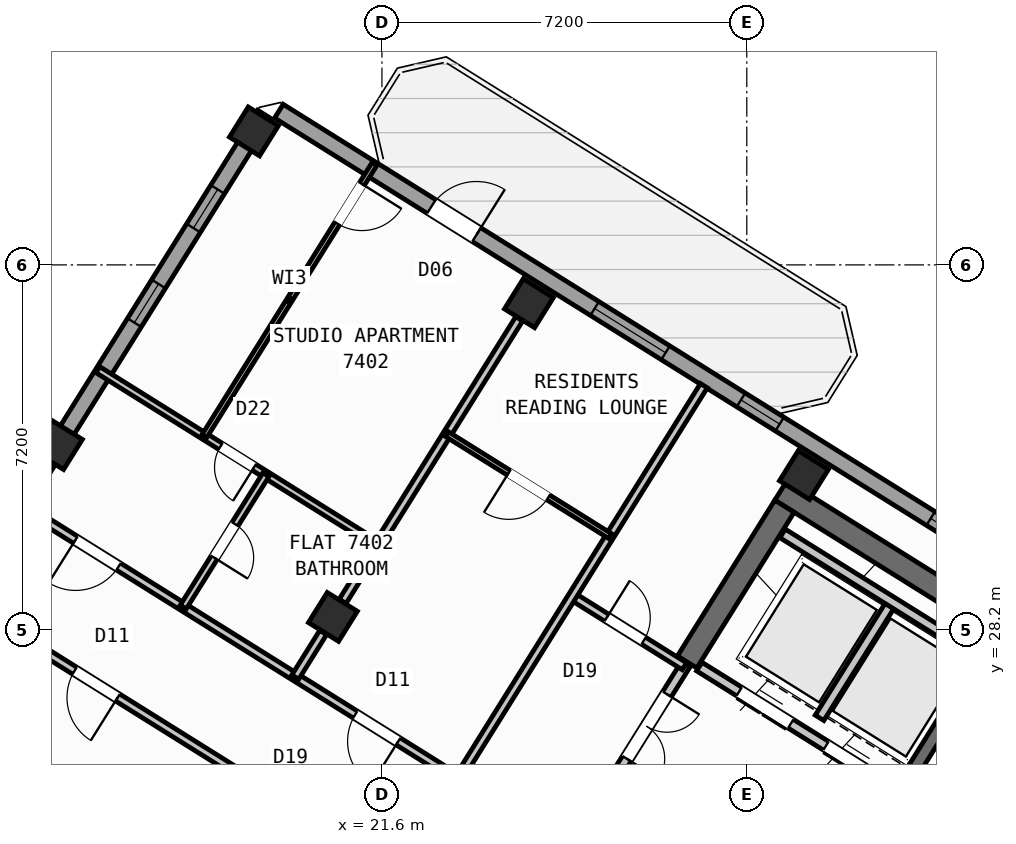
"""IFC4 building model, lengths in metres.
Left out: names, types, materials, properties, quantities, classifications, styles, units other than length and angle.
Written with IfcOpenShell. Run it as: python <this file> out.ifc"""

import sys

from ifc_helpers import new_model, si_unit, direction, frame, frame_2d, origin, origin_2d, place, context, subcontext, project, spatial, rectangle, hollow_rectangle, extrude, source, transform, mapped, element, fill, save


model = new_model("IFC4")
c1 = context("Model", 3, precision=1e-05, world=origin(), true_north=direction((0.0, 1.0)))
c2 = subcontext(c1, "Body", "Model", "MODEL_VIEW")
j1 = project(units=[si_unit("LENGTHUNIT", "METRE"), si_unit("PLANEANGLEUNIT", "RADIAN")], contexts=[c1])
p1 = place(None, origin())
s1 = spatial("IfcSite", under=j1, at=p1, CompositionType="ELEMENT")
p2 = place(p1, origin())
s2 = spatial("IfcBuilding", under=s1, at=p2, CompositionType="ELEMENT")
p3 = place(p2, frame((0.0, 0.0, 291.6)))
s3 = spatial("IfcBuildingStorey", under=s2, at=p3, CompositionType="ELEMENT", Elevation=291.6)
p4 = place(p3, frame((40.531, 24.036, 0.0), z_axis=(0.0, 0.0, 1.0), x_axis=(-0.848048787466, 0.529918157905, 0.0)))
e1 = element("IfcWall", 1, at=p4, inside=s3, PredefinedType="SHEAR", context=c2, shape_type="SweptSolid", body=[
    extrude(rectangle(XDim=13.04, YDim=0.45, at=frame_2d((6.52, 0.0))), origin(), (0.0, 0.0, 1.0), 3.35),
])
p5 = place(p3, frame((29.544, 30.636, 0.0), z_axis=(0.0, 0.0, 1.0), x_axis=(-0.529902075036, -0.848058836916, 0.0)))
e2 = element("IfcWall", 2, at=p5, inside=s3, PredefinedType="SHEAR", context=c2, shape_type="SweptSolid", body=[
    extrude(rectangle(XDim=3.625, YDim=0.45, at=frame_2d((1.812, 0.0))), origin(), (0.0, 0.0, 1.0), 3.35),
])
m1 = source(origin(), c2, "Body", "SweptSolid", [
    extrude(hollow_rectangle(XDim=0.7, YDim=0.7, WallThickness=0.028, at=origin_2d()), origin(), (0.0, 0.0, 1.0), 3.6),
])
for number, where, z_axis, x_axis in (
    (3, (29.928, 31.251, 0.0), (0.0, 0.0, 1.0), (-0.848, 0.53, 0.0)),
    (4, (24.5, 34.643, 0.0), (0.0, 0.0, 1.0), (-0.848, 0.53, 0.0)),
    (5, (20.632, 28.452, 0.0), (0.0, 0.0, 1.0), (-0.848, 0.53, 0.0)),
    (6, (19.073, 38.034, 0.0), (0.0, 0.0, 1.0), (-0.848, 0.53, 0.0)),
    (7, (15.205, 31.844, 0.0), (0.0, 0.0, 1.0), (-0.848, 0.53, 0.0)),
):
    element("IfcColumn", number, at=place(p3, frame(where, z_axis=z_axis, x_axis=x_axis)), inside=s3, PredefinedType="COLUMN", context=c2, shape_type="MappedRepresentation", body=[
        mapped(m1, transform((0.0, 0.0, 0.0), scale=1.0)),
    ])
p6 = place(p3, frame((7.842, 20.061, 0.0), z_axis=(0.0, 0.0, 1.0), x_axis=(0.529915577903, 0.84805039962, 0.0)))
e8 = element("IfcWall", 8, at=p6, inside=s3, PredefinedType="STANDARD", context=c2, shape_type="SweptSolid", body=[
    extrude(rectangle(XDim=21.587, YDim=0.32, at=frame_2d((10.794, 0.0))), origin(), (0.0, 0.0, 1.0), 2.875),
])
p7 = place(p6, frame((1.368, 0.0, 0.9)))
e9 = element("IfcOpeningElement", 9, at=p7, cuts=e8, PredefinedType="OPENING", context=c2, shape_type="SweptSolid", body=[
    extrude(rectangle(XDim=1.65, YDim=1.45, at=frame_2d((0.825, 0.725))), frame((0.0, 0.17, 0.0), z_axis=(0.0, -1.0, 0.0), x_axis=(1.0, 0.0, 0.0)), (0.0, 0.0, 1.0), 0.34),
])
p8 = place(p6, frame((4.71, 0.0, 1.0)))
e10 = element("IfcOpeningElement", 10, at=p8, cuts=e8, PredefinedType="OPENING", context=c2, shape_type="SweptSolid", body=[
    extrude(rectangle(XDim=0.9, YDim=1.25, at=frame_2d((0.45, 0.625))), frame((0.0, 0.17, 0.0), z_axis=(0.0, -1.0, 0.0), x_axis=(1.0, 0.0, 0.0)), (0.0, 0.0, 1.0), 0.34),
])
p9 = place(p6, frame((7.554, 0.0, 0.95)))
e11 = element("IfcOpeningElement", 11, at=p9, cuts=e8, PredefinedType="OPENING", context=c2, shape_type="SweptSolid", body=[
    extrude(rectangle(XDim=1.95, YDim=1.35, at=frame_2d((0.975, 0.675))), frame((0.0, 0.17, 0.0), z_axis=(0.0, -1.0, 0.0), x_axis=(1.0, 0.0, 0.0)), (0.0, 0.0, 1.0), 0.34),
])
p10 = place(p6, frame((16.744, 0.0, 1.0)))
e12 = element("IfcOpeningElement", 12, at=p10, cuts=e8, PredefinedType="OPENING", context=c2, shape_type="SweptSolid", body=[
    extrude(rectangle(XDim=0.9, YDim=1.25, at=frame_2d((0.45, 0.625))), frame((0.0, 0.17, 0.0), z_axis=(0.0, -1.0, 0.0), x_axis=(1.0, 0.0, 0.0)), (0.0, 0.0, 1.0), 0.34),
])
p11 = place(p6, frame((18.944, 0.0, 1.0)))
e13 = element("IfcOpeningElement", 13, at=p11, cuts=e8, PredefinedType="OPENING", context=c2, shape_type="SweptSolid", body=[
    extrude(rectangle(XDim=0.9, YDim=1.25, at=frame_2d((0.45, 0.625))), frame((0.0, 0.17, 0.0), z_axis=(0.0, -1.0, 0.0), x_axis=(1.0, 0.0, 0.0)), (0.0, 0.0, 1.0), 0.34),
])
p12 = place(p3, frame((19.566, 38.434, 0.0), z_axis=(0.0, 0.0, 1.0), x_axis=(0.84804567626, -0.529923136858, 0.0)))
e14 = element("IfcWall", 14, at=p12, inside=s3, PredefinedType="STANDARD", context=c2, shape_type="SweptSolid", body=[
    extrude(rectangle(XDim=25.188, YDim=0.32, at=frame_2d((12.594, 0.0))), origin(), (0.0, 0.0, 1.0), 3.35),
])
p13 = place(p12, frame((3.55, 0.0, 0.0)))
e15 = element("IfcOpeningElement", 15, at=p13, cuts=e14, PredefinedType="OPENING", context=c2, shape_type="SweptSolid", body=[
    extrude(rectangle(XDim=1.05, YDim=2.15, at=frame_2d((0.525, 1.075))), frame((0.0, 0.17, 0.0), z_axis=(0.0, -1.0, 0.0), x_axis=(1.0, 0.0, 0.0)), (0.0, 0.0, 1.0), 0.34),
])
p14 = place(p12, frame((7.349, 0.0, 0.9)))
e16 = element("IfcOpeningElement", 16, at=p14, cuts=e14, PredefinedType="OPENING", context=c2, shape_type="SweptSolid", body=[
    extrude(rectangle(XDim=1.65, YDim=1.45, at=frame_2d((0.825, 0.725))), frame((0.0, 0.17, 0.0), z_axis=(0.0, -1.0, 0.0), x_axis=(1.0, 0.0, 0.0)), (0.0, 0.0, 1.0), 0.34),
])
p15 = place(p12, frame((10.754, 0.0, 1.0)))
e17 = element("IfcOpeningElement", 17, at=p15, cuts=e14, PredefinedType="OPENING", context=c2, shape_type="SweptSolid", body=[
    extrude(rectangle(XDim=0.9, YDim=1.25, at=frame_2d((0.45, 0.625))), frame((0.0, 0.17, 0.0), z_axis=(0.0, -1.0, 0.0), x_axis=(1.0, 0.0, 0.0)), (0.0, 0.0, 1.0), 0.34),
])
p16 = place(p12, frame((15.169, 0.0, 0.95)))
e18 = element("IfcOpeningElement", 18, at=p16, cuts=e14, PredefinedType="OPENING", context=c2, shape_type="SweptSolid", body=[
    extrude(rectangle(XDim=1.95, YDim=1.35, at=frame_2d((0.975, 0.675))), frame((0.0, 0.17, 0.0), z_axis=(0.0, -1.0, 0.0), x_axis=(1.0, 0.0, 0.0)), (0.0, 0.0, 1.0), 0.34),
])
p17 = place(p12, frame((20.869, 0.0, 0.95)))
e19 = element("IfcOpeningElement", 19, at=p17, cuts=e14, PredefinedType="OPENING", context=c2, shape_type="SweptSolid", body=[
    extrude(rectangle(XDim=1.95, YDim=1.35, at=frame_2d((0.975, 0.675))), frame((0.0, 0.17, 0.0), z_axis=(0.0, -1.0, 0.0), x_axis=(1.0, 0.0, 0.0)), (0.0, 0.0, 1.0), 0.34),
])
p18 = place(p3, frame((33.496, 27.677, 0.0), z_axis=(0.0, 0.0, 1.0), x_axis=(-0.529908658664, -0.84805472316, 0.0)))
e20 = element("IfcWall", 20, at=p18, inside=s3, PredefinedType="SHEAR", context=c2, shape_type="SweptSolid", body=[
    extrude(rectangle(XDim=3.16, YDim=0.26, at=frame_2d((1.58, 0.0))), origin(), (0.0, 0.0, 1.0), 3.35),
])
p19 = place(p3, frame((31.822, 24.998, 0.0), z_axis=(0.0, 0.0, 1.0), x_axis=(-0.848054125777, 0.529909614701, 0.0)))
e21 = element("IfcWall", 21, at=p19, inside=s3, PredefinedType="STANDARD", context=c2, shape_type="SweptSolid", body=[
    extrude(rectangle(XDim=4.668, YDim=0.2, at=frame_2d((2.334, 0.0))), origin(), (0.0, 0.0, 1.0), 3.34),
])
p20 = place(p19, frame((0.52, 0.0, 0.0)))
e22 = element("IfcOpeningElement", 22, at=p20, cuts=e21, PredefinedType="OPENING", context=c2, shape_type="SweptSolid", body=[
    extrude(rectangle(XDim=1.2, YDim=2.15, at=frame_2d((0.6, 1.075))), frame((0.0, 0.11, 0.0), z_axis=(0.0, -1.0, 0.0), x_axis=(1.0, 0.0, 0.0)), (0.0, 0.0, 1.0), 0.22),
])
p21 = place(p19, frame((2.54, 0.0, 0.0)))
e23 = element("IfcOpeningElement", 23, at=p21, cuts=e21, PredefinedType="OPENING", context=c2, shape_type="SweptSolid", body=[
    extrude(rectangle(XDim=1.2, YDim=2.15, at=frame_2d((0.6, 1.075))), frame((0.0, 0.11, 0.0), z_axis=(0.0, -1.0, 0.0), x_axis=(1.0, 0.0, 0.0)), (0.0, 0.0, 1.0), 0.22),
])
p22 = place(p3, frame((31.645, 28.716, 0.0), z_axis=(0.0, 0.0, 1.0), x_axis=(-0.52986693015, -0.848080795876, 0.0)))
e24 = element("IfcWall", 24, at=p22, inside=s3, PredefinedType="STANDARD", context=c2, shape_type="SweptSolid", body=[
    extrude(rectangle(XDim=2.66, YDim=0.2, at=frame_2d((1.33, 0.0))), origin(), (0.0, 0.0, 1.0), 3.34),
])
p23 = place(p3, frame((33.363, 27.69, 0.0), z_axis=(0.0, 0.0, 1.0), x_axis=(-0.84804957148, 0.529916903215, 0.0)))
e25 = element("IfcWall", 25, at=p23, inside=s3, PredefinedType="STANDARD", context=c2, shape_type="SweptSolid", body=[
    extrude(rectangle(XDim=4.548, YDim=0.2, at=frame_2d((2.274, 0.0))), origin(), (0.0, 0.0, 1.0), 3.34),
])
p24 = place(p3, frame((27.596, 27.52, 0.0), z_axis=(0.0, 0.0, 1.0), x_axis=(-0.529865479138, -0.848081702443, 0.0)))
e26 = element("IfcWall", 26, at=p24, inside=s3, PredefinedType="STANDARD", context=c2, shape_type="SweptSolid", body=[
    extrude(rectangle(XDim=2.96, YDim=0.2, at=frame_2d((1.48, 0.0))), origin(), (0.0, 0.0, 1.0), 3.34),
])
p25 = place(p24, frame((0.7, 0.0, 0.0)))
e27 = element("IfcOpeningElement", 27, at=p25, cuts=e26, PredefinedType="OPENING", context=c2, shape_type="SweptSolid", body=[
    extrude(rectangle(XDim=1.5, YDim=2.15, at=frame_2d((0.75, 1.075))), frame((0.0, 0.11, 0.0), z_axis=(0.0, -1.0, 0.0), x_axis=(1.0, 0.0, 0.0)), (0.0, 0.0, 1.0), 0.22),
])
p26 = place(p3, frame((27.57, 27.478, 0.0), z_axis=(0.0, 0.0, 1.0), x_axis=(-0.848050851465, 0.529914854792, 0.0)))
e28 = element("IfcWall", 28, at=p26, inside=s3, PredefinedType="PARTITIONING", context=c2, shape_type="SweptSolid", body=[
    extrude(rectangle(XDim=2.61, YDim=0.16, at=frame_2d((1.305, 0.0))), origin(), (0.0, 0.0, 1.0), 3.34),
])
p27 = place(p26, frame((0.95, 0.0, 0.0)))
e29 = element("IfcOpeningElement", 29, at=p27, cuts=e28, PredefinedType="OPENING", context=c2, shape_type="SweptSolid", body=[
    extrude(rectangle(XDim=0.86, YDim=2.05, at=frame_2d((0.43, 1.025))), frame((0.0, 0.09, 0.0), z_axis=(0.0, -1.0, 0.0), x_axis=(1.0, 0.0, 0.0)), (0.0, 0.0, 1.0), 0.18),
])
p28 = place(p3, frame((27.953, 33.016, 0.0), z_axis=(0.0, 0.0, 1.0), x_axis=(-0.529903001606, -0.848058257957, 0.0)))
e30 = element("IfcWall", 30, at=p28, inside=s3, PredefinedType="PARTITIONING", context=c2, shape_type="SweptSolid", body=[
    extrude(rectangle(XDim=9.15, YDim=0.16, at=frame_2d((4.575, 0.0))), origin(), (0.0, 0.0, 1.0), 3.34),
])
p29 = place(p3, frame((23.104, 25.256, 0.0), z_axis=(0.0, 0.0, 1.0), x_axis=(-0.848043444964, 0.529926707624, 0.0)))
e31 = element("IfcWall", 31, at=p29, inside=s3, PredefinedType="PARTITIONING", context=c2, shape_type="SweptSolid", body=[
    extrude(rectangle(XDim=10.33, YDim=0.16, at=frame_2d((5.165, 0.0))), origin(), (0.0, 0.0, 1.0), 3.34),
])
p30 = place(p29, frame((1.395, 0.0, 0.0)))
e32 = element("IfcOpeningElement", 32, at=p30, cuts=e31, PredefinedType="OPENING", context=c2, shape_type="SweptSolid", body=[
    extrude(rectangle(XDim=1.0, YDim=2.1, at=frame_2d((0.5, 1.05))), frame((0.0, 0.09, 0.0), z_axis=(0.0, -1.0, 0.0), x_axis=(1.0, 0.0, 0.0)), (0.0, 0.0, 1.0), 0.18),
])
p31 = place(p29, frame((7.904, 0.0, 0.0)))
e33 = element("IfcOpeningElement", 33, at=p31, cuts=e31, PredefinedType="OPENING", context=c2, shape_type="SweptSolid", body=[
    extrude(rectangle(XDim=1.0, YDim=2.1, at=frame_2d((0.5, 1.05))), frame((0.0, 0.09, 0.0), z_axis=(0.0, -1.0, 0.0), x_axis=(1.0, 0.0, 0.0)), (0.0, 0.0, 1.0), 0.18),
])
p32 = place(p3, frame((21.938, 23.391, 0.0), z_axis=(0.0, 0.0, 1.0), x_axis=(-0.848050081784, 0.529916086552, 0.0)))
e34 = element("IfcWall", 34, at=p32, inside=s3, PredefinedType="PARTITIONING", context=c2, shape_type="SweptSolid", body=[
    extrude(rectangle(XDim=10.33, YDim=0.16, at=frame_2d((5.165, 0.0))), origin(), (0.0, 0.0, 1.0), 3.34),
])
p33 = place(p32, frame((2.22, 0.0, 0.0)))
e35 = element("IfcOpeningElement", 35, at=p33, cuts=e34, PredefinedType="OPENING", context=c2, shape_type="SweptSolid", body=[
    extrude(rectangle(XDim=0.86, YDim=2.05, at=frame_2d((0.43, 1.025))), frame((0.0, 0.09, 0.0), z_axis=(0.0, -1.0, 0.0), x_axis=(1.0, 0.0, 0.0)), (0.0, 0.0, 1.0), 0.18),
])
p34 = place(p32, frame((6.55, 0.0, 0.0)))
e36 = element("IfcOpeningElement", 36, at=p34, cuts=e34, PredefinedType="OPENING", context=c2, shape_type="SweptSolid", body=[
    extrude(rectangle(XDim=1.0, YDim=2.1, at=frame_2d((0.5, 1.05))), frame((0.0, 0.09, 0.0), z_axis=(0.0, -1.0, 0.0), x_axis=(1.0, 0.0, 0.0)), (0.0, 0.0, 1.0), 0.18),
])
p35 = place(p3, frame((24.309, 34.336, 0.0), z_axis=(0.0, 0.0, 1.0), x_axis=(-0.529895484599, -0.848062954858, 0.0)))
e37 = element("IfcWall", 37, at=p35, inside=s3, PredefinedType="PARTITIONING", context=c2, shape_type="SweptSolid", body=[
    extrude(rectangle(XDim=6.576, YDim=0.16, at=frame_2d((3.288, 0.0))), origin(), (0.0, 0.0, 1.0), 2.875),
])
p36 = place(p3, frame((20.44, 28.145, 0.0), z_axis=(0.0, 0.0, 1.0), x_axis=(-0.529977795385, -0.848011519025, 0.0)))
e38 = element("IfcWall", 38, at=p36, inside=s3, PredefinedType="PARTITIONING", context=c2, shape_type="SweptSolid", body=[
    extrude(rectangle(XDim=1.038, YDim=0.16, at=frame_2d((0.519, 0.0))), origin(), (0.0, 0.0, 1.0), 2.875),
])
p37 = place(p3, frame((26.099, 30.05, 0.0), z_axis=(0.0, 0.0, 1.0), x_axis=(-0.84803087207, 0.529946827537, 0.0)))
e39 = element("IfcWall", 39, at=p37, inside=s3, PredefinedType="PARTITIONING", context=c2, shape_type="SweptSolid", body=[
    extrude(rectangle(XDim=3.79, YDim=0.11, at=frame_2d((1.895, 0.0))), origin(), (0.0, 0.0, 1.0), 3.34),
])
p38 = place(p37, frame((1.435, 0.0, 0.0)))
e40 = element("IfcOpeningElement", 40, at=p38, cuts=e39, PredefinedType="OPENING", context=c2, shape_type="SweptSolid", body=[
    extrude(rectangle(XDim=0.92, YDim=2.08, at=frame_2d((0.46, 1.04))), frame((0.0, 0.065, 0.0), z_axis=(0.0, -1.0, 0.0), x_axis=(1.0, 0.0, 0.0)), (0.0, 0.0, 1.0), 0.13),
])
p39 = place(p3, frame((21.522, 29.877, 0.0), z_axis=(0.0, 0.0, 1.0), x_axis=(-0.848048787466, 0.529918157905, 0.0)))
e41 = element("IfcWall", 41, at=p39, inside=s3, PredefinedType="PLUMBINGWALL", context=c2, shape_type="SweptSolid", body=[
    extrude(rectangle(XDim=6.52, YDim=0.14, at=frame_2d((3.26, 0.0))), origin(), (0.0, 0.0, 1.0), 3.34),
])
p40 = place(p39, frame((2.885, 0.0, 0.0)))
e42 = element("IfcOpeningElement", 42, at=p40, cuts=e41, PredefinedType="OPENING", context=c2, shape_type="SweptSolid", body=[
    extrude(rectangle(XDim=0.78, YDim=2.05, at=frame_2d((0.39, 1.025))), frame((0.0, 0.08, 0.0), z_axis=(0.0, -1.0, 0.0), x_axis=(1.0, 0.0, 0.0)), (0.0, 0.0, 1.0), 0.16),
])
p41 = place(p3, frame((19.311, 31.259, 0.0), z_axis=(0.0, 0.0, 1.0), x_axis=(-0.52989206052, -0.848065094316, 0.0)))
e43 = element("IfcWall", 43, at=p41, inside=s3, PredefinedType="PLUMBINGWALL", context=c2, shape_type="SweptSolid", body=[
    extrude(rectangle(XDim=3.08, YDim=0.14, at=frame_2d((1.54, 0.0))), origin(), (0.0, 0.0, 1.0), 3.34),
])
p42 = place(p41, frame((1.15, 0.0, 0.0)))
e44 = element("IfcOpeningElement", 44, at=p42, cuts=e43, PredefinedType="OPENING", context=c2, shape_type="SweptSolid", body=[
    extrude(rectangle(XDim=0.78, YDim=2.05, at=frame_2d((0.39, 1.025))), frame((0.0, 0.08, 0.0), z_axis=(0.0, -1.0, 0.0), x_axis=(1.0, 0.0, 0.0)), (0.0, 0.0, 1.0), 0.16),
])
p43 = place(p3, frame((21.454, 37.395, 0.0), z_axis=(0.0, 0.0, 1.0), x_axis=(-0.529922785174, -0.848045896018, 0.0)))
e45 = element("IfcWall", 45, at=p43, inside=s3, PredefinedType="PARTITIONING", context=c2, shape_type="SweptSolid", body=[
    extrude(rectangle(XDim=6.34, YDim=0.11, at=frame_2d((3.17, 0.0))), origin(), (0.0, 0.0, 1.0), 3.025),
])
p44 = place(p43, frame((0.47, 0.0, 0.0)))
e46 = element("IfcOpeningElement", 46, at=p44, cuts=e45, PredefinedType="OPENING", context=c2, shape_type="SweptSolid", body=[
    extrude(rectangle(XDim=0.92, YDim=2.08, at=frame_2d((0.46, 1.04))), frame((0.0, 0.065, 0.0), z_axis=(0.0, -1.0, 0.0), x_axis=(1.0, 0.0, 0.0)), (0.0, 0.0, 1.0), 0.13),
])
m2 = source(origin(), c2, "Body", "SweptSolid", [
    extrude(rectangle(XDim=1.05, YDim=2.15, at=frame_2d((0.525, 1.075))), frame((0.0, 0.025, 0.0), z_axis=(0.0, -1.0, 0.0), x_axis=(1.0, 0.0, 0.0)), (0.0, 0.0, 1.0), 0.05),
])
p45 = place(p13, origin())
e47 = element("IfcDoor", 47, at=p45, inside=s3, OperationType="SINGLE_SWING_RIGHT", PredefinedType="DOOR", context=c2, shape_type="MappedRepresentation", body=[
    mapped(m2, transform((0.0, 0.0, 0.0), scale=1.0)),
])
fill(e15, e47)
m3 = source(origin(), c2, "Body", "SweptSolid", [
    extrude(rectangle(XDim=0.9, YDim=1.25, at=frame_2d((0.45, 0.625))), frame((0.0, 0.03, 0.0), z_axis=(0.0, -1.0, 0.0), x_axis=(1.0, 0.0, 0.0)), (0.0, 0.0, 1.0), 0.06),
])
p46 = place(p10, origin())
e48 = element("IfcWindow", 48, at=p46, inside=s3, PartitioningType="SINGLE_PANEL", PredefinedType="WINDOW", context=c2, shape_type="MappedRepresentation", body=[
    mapped(m3, transform((0.0, 0.0, 0.0), scale=1.0)),
])
fill(e12, e48)
p47 = place(p11, origin())
e49 = element("IfcWindow", 49, at=p47, inside=s3, PartitioningType="SINGLE_PANEL", PredefinedType="WINDOW", context=c2, shape_type="MappedRepresentation", body=[
    mapped(m3, transform((0.0, 0.0, 0.0), scale=1.0)),
])
fill(e13, e49)
m4 = source(origin(), c2, "Body", "SweptSolid", [
    extrude(rectangle(XDim=1.65, YDim=1.45, at=frame_2d((0.825, 0.725))), frame((0.0, 0.03, 0.0), z_axis=(0.0, -1.0, 0.0), x_axis=(1.0, 0.0, 0.0)), (0.0, 0.0, 1.0), 0.06),
])
p48 = place(p14, origin())
e50 = element("IfcWindow", 50, at=p48, inside=s3, PartitioningType="SINGLE_PANEL", PredefinedType="WINDOW", context=c2, shape_type="MappedRepresentation", body=[
    mapped(m4, transform((0.0, 0.0, 0.0), scale=1.0)),
])
fill(e16, e50)
p49 = place(p15, origin())
e51 = element("IfcWindow", 51, at=p49, inside=s3, PartitioningType="SINGLE_PANEL", PredefinedType="WINDOW", context=c2, shape_type="MappedRepresentation", body=[
    mapped(m3, transform((0.0, 0.0, 0.0), scale=1.0)),
])
fill(e17, e51)
m5 = source(origin(), c2, "Body", "SweptSolid", [
    extrude(rectangle(XDim=1.95, YDim=1.35, at=frame_2d((0.975, 0.675))), frame((0.0, 0.03, 0.0), z_axis=(0.0, -1.0, 0.0), x_axis=(1.0, 0.0, 0.0)), (0.0, 0.0, 1.0), 0.06),
])
p50 = place(p16, origin())
e52 = element("IfcWindow", 52, at=p50, inside=s3, PartitioningType="SINGLE_PANEL", PredefinedType="WINDOW", context=c2, shape_type="MappedRepresentation", body=[
    mapped(m5, transform((0.0, 0.0, 0.0), scale=1.0)),
])
fill(e18, e52)
m6 = source(origin(), c2, "Body", "SweptSolid", [
    extrude(rectangle(XDim=1.2, YDim=2.15, at=frame_2d((0.6, 1.075))), frame((0.0, 0.025, 0.0), z_axis=(0.0, -1.0, 0.0), x_axis=(1.0, 0.0, 0.0)), (0.0, 0.0, 1.0), 0.05),
])
p51 = place(p20, origin())
e53 = element("IfcDoor", 53, at=p51, inside=s3, OperationType="DOUBLE_DOOR_SLIDING", PredefinedType="DOOR", context=c2, shape_type="MappedRepresentation", body=[
    mapped(m6, transform((0.0, 0.0, 0.0), scale=1.0)),
])
fill(e22, e53)
p52 = place(p21, origin())
e54 = element("IfcDoor", 54, at=p52, inside=s3, OperationType="DOUBLE_DOOR_SLIDING", PredefinedType="DOOR", context=c2, shape_type="MappedRepresentation", body=[
    mapped(m6, transform((0.0, 0.0, 0.0), scale=1.0)),
])
fill(e23, e54)
m7 = source(origin(), c2, "Body", "SweptSolid", [
    extrude(rectangle(XDim=0.86, YDim=2.05, at=frame_2d((0.43, 1.025))), frame((0.0, 0.025, 0.0), z_axis=(0.0, -1.0, 0.0), x_axis=(1.0, 0.0, 0.0)), (0.0, 0.0, 1.0), 0.05),
])
p53 = place(p27, frame((0.86, 0.0, 0.0), z_axis=(0.0, 0.0, 1.0), x_axis=(-1.0, 0.0, 0.0)))
e55 = element("IfcDoor", 55, at=p53, inside=s3, OperationType="SINGLE_SWING_LEFT", PredefinedType="DOOR", context=c2, shape_type="MappedRepresentation", body=[
    mapped(m7, transform((0.0, 0.0, 0.0), scale=1.0)),
])
fill(e29, e55)
m8 = source(origin(), c2, "Body", "SweptSolid", [
    extrude(rectangle(XDim=1.5, YDim=2.15, at=frame_2d((0.75, 1.075))), frame((0.0, 0.025, 0.0), z_axis=(0.0, -1.0, 0.0), x_axis=(1.0, 0.0, 0.0)), (0.0, 0.0, 1.0), 0.05),
])
p54 = place(p25, origin())
e56 = element("IfcDoor", 56, at=p54, inside=s3, OperationType="DOUBLE_DOOR_SINGLE_SWING", PredefinedType="DOOR", context=c2, shape_type="MappedRepresentation", body=[
    mapped(m8, transform((0.0, 0.0, 0.0), scale=1.0)),
])
fill(e27, e56)
m9 = source(origin(), c2, "Body", "SweptSolid", [
    extrude(rectangle(XDim=1.0, YDim=2.1, at=frame_2d((0.5, 1.05))), frame((0.0, 0.025, 0.0), z_axis=(0.0, -1.0, 0.0), x_axis=(1.0, 0.0, 0.0)), (0.0, 0.0, 1.0), 0.05),
])
p55 = place(p34, origin())
e57 = element("IfcDoor", 57, at=p55, inside=s3, OperationType="SINGLE_SWING_LEFT", PredefinedType="DOOR", context=c2, shape_type="MappedRepresentation", body=[
    mapped(m9, transform((0.0, 0.0, 0.0), scale=1.0)),
])
fill(e36, e57)
p56 = place(p30, origin())
e58 = element("IfcDoor", 58, at=p56, inside=s3, OperationType="SINGLE_SWING_LEFT", PredefinedType="DOOR", context=c2, shape_type="MappedRepresentation", body=[
    mapped(m9, transform((0.0, 0.0, 0.0), scale=1.0)),
])
fill(e32, e58)
m10 = source(origin(), c2, "Body", "SweptSolid", [
    extrude(rectangle(XDim=0.92, YDim=2.08, at=frame_2d((0.46, 1.04))), frame((0.0, 0.025, 0.0), z_axis=(0.0, -1.0, 0.0), x_axis=(1.0, 0.0, 0.0)), (0.0, 0.0, 1.0), 0.05),
])
p57 = place(p38, origin())
e59 = element("IfcDoor", 59, at=p57, inside=s3, OperationType="SINGLE_SWING_RIGHT", PredefinedType="DOOR", context=c2, shape_type="MappedRepresentation", body=[
    mapped(m10, transform((0.0, 0.0, 0.0), scale=1.0)),
])
fill(e40, e59)
p58 = place(p44, origin())
e60 = element("IfcDoor", 60, at=p58, inside=s3, OperationType="SINGLE_SWING_LEFT", PredefinedType="DOOR", context=c2, shape_type="MappedRepresentation", body=[
    mapped(m10, transform((0.0, 0.0, 0.0), scale=1.0)),
])
fill(e46, e60)
p59 = place(p31, origin())
e61 = element("IfcDoor", 61, at=p59, inside=s3, OperationType="SINGLE_SWING_RIGHT", PredefinedType="DOOR", context=c2, shape_type="MappedRepresentation", body=[
    mapped(m9, transform((0.0, 0.0, 0.0), scale=1.0)),
])
fill(e33, e61)
m11 = source(origin(), c2, "Body", "SweptSolid", [
    extrude(rectangle(XDim=0.78, YDim=2.05, at=frame_2d((0.39, 1.025))), frame((0.0, 0.025, 0.0), z_axis=(0.0, -1.0, 0.0), x_axis=(1.0, 0.0, 0.0)), (0.0, 0.0, 1.0), 0.05),
])
p60 = place(p40, origin())
e62 = element("IfcDoor", 62, at=p60, inside=s3, OperationType="SINGLE_SWING_LEFT", PredefinedType="DOOR", context=c2, shape_type="MappedRepresentation", body=[
    mapped(m11, transform((0.0, 0.0, 0.0), scale=1.0)),
])
fill(e42, e62)
p61 = place(p42, origin())
e63 = element("IfcDoor", 63, at=p61, inside=s3, OperationType="SINGLE_SWING_RIGHT", PredefinedType="DOOR", context=c2, shape_type="MappedRepresentation", body=[
    mapped(m11, transform((0.0, 0.0, 0.0), scale=1.0)),
])
fill(e44, e63)
save(model, sys.argv[1])
